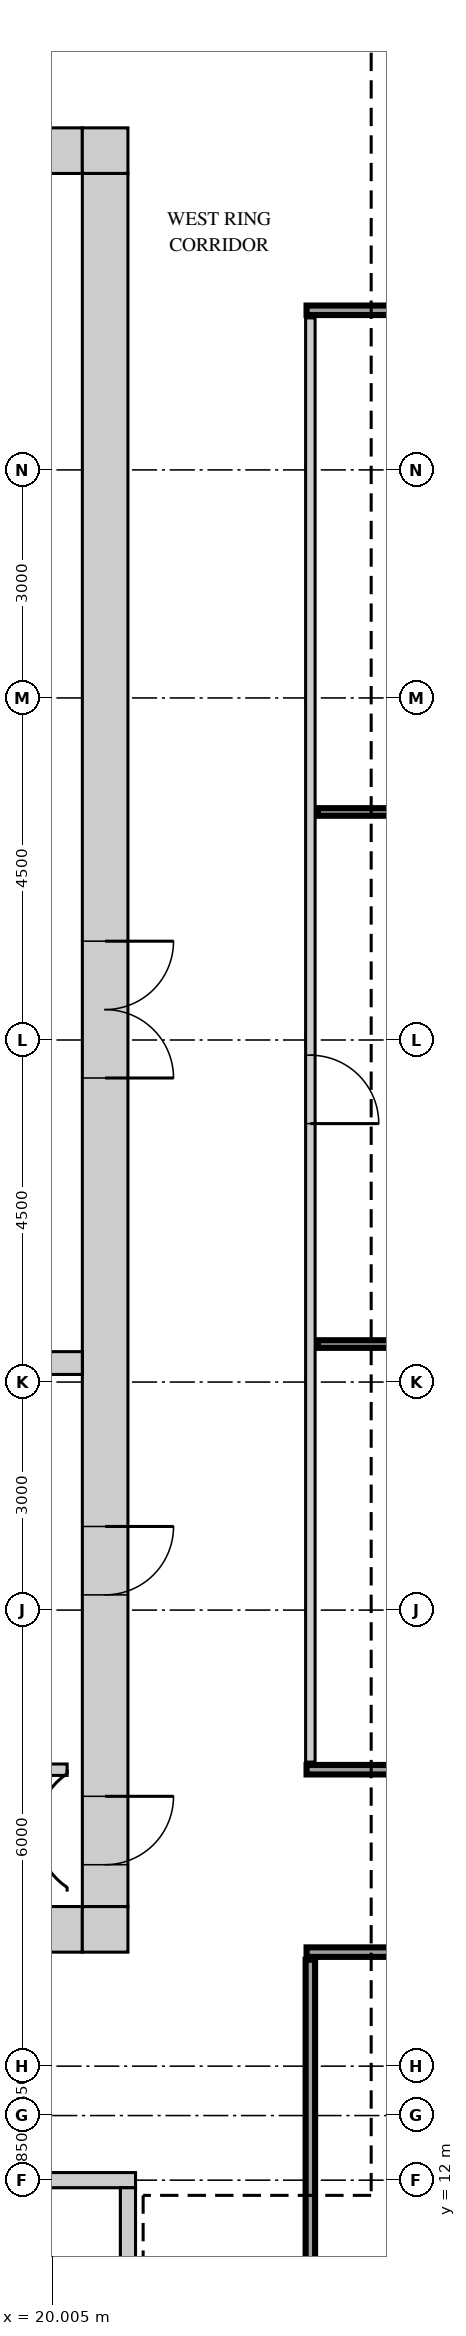
"""IFC4 building model, lengths in metres.
Left out: names, types, materials, properties, quantities, classifications, styles, units other than length and angle.
Written with IfcOpenShell. Run it as: python <this file> out.ifc"""

import sys

from ifc_helpers import new_model, si_unit, direction, frame, frame_2d, origin, place, context, subcontext, project, spatial, rectangle, extrude, source, transform, mapped, element, fill, save


model = new_model("IFC4")
c1 = context("Model", 3, precision=1e-05, world=origin(), true_north=direction((0.0, 1.0)))
c2 = subcontext(c1, "Body", "Model", "MODEL_VIEW")
j1 = project(units=[si_unit("LENGTHUNIT", "METRE"), si_unit("PLANEANGLEUNIT", "RADIAN")], contexts=[c1])
p1 = place(None, origin())
s1 = spatial("IfcSite", under=j1, at=p1, CompositionType="ELEMENT")
p2 = place(p1, origin())
s2 = spatial("IfcBuilding", under=s1, at=p2, CompositionType="ELEMENT")
p3 = place(p2, frame((0.0, 0.0, 302.2)))
s3 = spatial("IfcBuildingStorey", under=s2, at=p3, CompositionType="ELEMENT", Elevation=302.2)
m1 = source(origin(), c2, "Body", "SweptSolid", [
    extrude(rectangle(XDim=14.4, YDim=0.6, at=frame_2d((7.2, 0.0))), origin(), (0.0, 0.0, 1.0), 3.75),
])
p4 = place(p3, frame((6.0, 38.7, 0.0), z_axis=(0.0, 0.0, 1.0), x_axis=(1.0, 0.0, 0.0)))
e1 = element("IfcWall", 1, at=p4, inside=s3, PredefinedType="SHEAR", context=c2, shape_type="MappedRepresentation", body=[
    mapped(m1, transform((0.0, 0.0, 0.0))),
])
m2 = source(origin(), c2, "Body", "SweptSolid", [
    extrude(rectangle(XDim=0.9, YDim=2.1, at=frame_2d((0.45, 1.05))), frame((0.0, 0.31, 0.0), z_axis=(0.0, -1.0, 0.0), x_axis=(1.0, 0.0, 0.0)), (0.0, 0.0, 1.0), 0.62),
])
p5 = place(p4, frame((3.7, 0.0, 0.0)))
e2 = element("IfcOpeningElement", 2, at=p5, cuts=e1, PredefinedType="OPENING", context=c2, shape_type="MappedRepresentation", body=[
    mapped(m2, transform((0.0, 0.0, 0.0))),
])
p6 = place(p4, frame((8.7, 0.0, 0.0)))
e3 = element("IfcOpeningElement", 3, at=p6, cuts=e1, PredefinedType="OPENING", context=c2, shape_type="MappedRepresentation", body=[
    mapped(m2, transform((0.0, 0.0, 0.0))),
])
p7 = place(p4, frame((12.05, 0.0, 0.0)))
e4 = element("IfcOpeningElement", 4, at=p7, cuts=e1, PredefinedType="OPENING", context=c2, shape_type="MappedRepresentation", body=[
    mapped(m2, transform((0.0, 0.0, 0.0))),
])
m3 = source(origin(), c2, "Body", "SweptSolid", [
    extrude(rectangle(XDim=0.6, YDim=0.6, at=frame_2d((0.3, 0.0))), origin(), (0.0, 0.0, 1.0), 3.75),
])
p8 = place(p3, frame((20.4, 38.7, 0.0), z_axis=(0.0, 0.0, 1.0), x_axis=(1.0, 0.0, 0.0)))
e5 = element("IfcWall", 5, at=p8, inside=s3, PredefinedType="SHEAR", context=c2, shape_type="MappedRepresentation", body=[
    mapped(m3, transform((0.0, 0.0, 0.0))),
])
p9 = place(p3, frame((6.0, 15.3, 0.0), z_axis=(0.0, 0.0, 1.0), x_axis=(1.0, 0.0, 0.0)))
e6 = element("IfcWall", 6, at=p9, inside=s3, PredefinedType="SHEAR", context=c2, shape_type="MappedRepresentation", body=[
    mapped(m1, transform((0.0, 0.0, 0.0))),
])
m4 = source(origin(), c2, "Body", "SweptSolid", [
    extrude(rectangle(XDim=1.2, YDim=2.1, at=frame_2d((0.6, 1.05))), frame((0.0, 0.31, 0.0), z_axis=(0.0, -1.0, 0.0), x_axis=(1.0, 0.0, 0.0)), (0.0, 0.0, 1.0), 0.62),
])
p10 = place(p9, frame((6.2, 0.0, 0.0)))
e7 = element("IfcOpeningElement", 7, at=p10, cuts=e6, PredefinedType="OPENING", context=c2, shape_type="MappedRepresentation", body=[
    mapped(m4, transform((0.0, 0.0, 0.0))),
])
p11 = place(p9, frame((2.85, 0.0, 0.0)))
e8 = element("IfcOpeningElement", 8, at=p11, cuts=e6, PredefinedType="OPENING", context=c2, shape_type="MappedRepresentation", body=[
    mapped(m4, transform((0.0, 0.0, 0.0))),
])
m5 = source(origin(), c2, "Body", "SweptSolid", [
    extrude(rectangle(XDim=1.0, YDim=2.1, at=frame_2d((0.5, 1.05))), frame((0.0, 0.31, 0.0), z_axis=(0.0, -1.0, 0.0), x_axis=(1.0, 0.0, 0.0)), (0.0, 0.0, 1.0), 0.62),
])
p12 = place(p9, frame((8.7, 0.0, 0.0)))
e9 = element("IfcOpeningElement", 9, at=p12, cuts=e6, PredefinedType="OPENING", context=c2, shape_type="MappedRepresentation", body=[
    mapped(m5, transform((0.0, 0.0, 0.0))),
])
p13 = place(p3, frame((20.4, 15.3, 0.0), z_axis=(0.0, 0.0, 1.0), x_axis=(1.0, 0.0, 0.0)))
e10 = element("IfcWall", 10, at=p13, inside=s3, PredefinedType="SHEAR", context=c2, shape_type="MappedRepresentation", body=[
    mapped(m3, transform((0.0, 0.0, 0.0))),
])
m6 = source(origin(), c2, "Body", "SweptSolid", [
    extrude(rectangle(XDim=22.8, YDim=0.6, at=frame_2d((11.4, 0.0))), origin(), (0.0, 0.0, 1.0), 3.75),
])
p14 = place(p3, frame((20.7, 15.6, 0.0), z_axis=(0.0, 0.0, 1.0), x_axis=(0.0, 1.0, 0.0)))
e11 = element("IfcWall", 11, at=p14, inside=s3, PredefinedType="SHEAR", context=c2, shape_type="MappedRepresentation", body=[
    mapped(m6, transform((0.0, 0.0, 0.0))),
])
m7 = source(origin(), c2, "Body", "SweptSolid", [
    extrude(rectangle(XDim=1.8, YDim=2.1, at=frame_2d((0.9, 1.05))), frame((0.0, 0.31, 0.0), z_axis=(0.0, -1.0, 0.0), x_axis=(1.0, 0.0, 0.0)), (0.0, 0.0, 1.0), 0.62),
])
p15 = place(p14, frame((10.9, 0.0, 0.0)))
e12 = element("IfcOpeningElement", 12, at=p15, cuts=e11, PredefinedType="OPENING", context=c2, shape_type="MappedRepresentation", body=[
    mapped(m7, transform((0.0, 0.0, 0.0))),
])
p16 = place(p14, frame((0.55, 0.0, 0.0)))
e13 = element("IfcOpeningElement", 13, at=p16, cuts=e11, PredefinedType="OPENING", context=c2, shape_type="MappedRepresentation", body=[
    mapped(m2, transform((0.0, 0.0, 0.0))),
])
p17 = place(p14, frame((4.1, 0.0, 0.0)))
e14 = element("IfcOpeningElement", 14, at=p17, cuts=e11, PredefinedType="OPENING", context=c2, shape_type="MappedRepresentation", body=[
    mapped(m2, transform((0.0, 0.0, 0.0))),
])
m8 = source(origin(), c2, "Body", "SweptSolid", [
    extrude(rectangle(XDim=7.2, YDim=0.2, at=frame_2d((3.6, 0.0))), origin(), (0.0, 0.0, 1.0), 3.75),
])
p18 = place(p3, frame((13.9, 12.0, 0.0), z_axis=(0.0, 0.0, 1.0), x_axis=(1.0, 0.0, 0.0)))
e15 = element("IfcWall", 15, at=p18, inside=s3, PredefinedType="SHEAR", context=c2, shape_type="MappedRepresentation", body=[
    mapped(m8, transform((0.0, 0.0, 0.0))),
])
m9 = source(origin(), c2, "Body", "SweptSolid", [
    extrude(rectangle(XDim=3.35, YDim=0.2, at=frame_2d((1.675, 0.0))), origin(), (0.0, 0.0, 1.0), 3.75),
])
p19 = place(p3, frame((21.0, 8.55, 0.0), z_axis=(0.0, 0.0, 1.0), x_axis=(0.0, 1.0, 0.0)))
e16 = element("IfcWall", 16, at=p19, inside=s3, PredefinedType="SHEAR", context=c2, shape_type="MappedRepresentation", body=[
    mapped(m9, transform((0.0, 0.0, 0.0))),
])
m10 = source(origin(), c2, "Body", "SweptSolid", [
    extrude(rectangle(XDim=13.2, YDim=0.3, at=frame_2d((6.6, 0.0))), origin(), (0.0, 0.0, 1.0), 3.75),
])
p20 = place(p3, frame((7.2, 22.75, 0.0), z_axis=(0.0, 0.0, 1.0), x_axis=(1.0, 0.0, 0.0)))
e17 = element("IfcWall", 17, at=p20, inside=s3, PredefinedType="STANDARD", context=c2, shape_type="MappedRepresentation", body=[
    mapped(m10, transform((0.0, 0.0, 0.0))),
])
m11 = source(origin(), c2, "Body", "SweptSolid", [
    extrude(rectangle(XDim=8.75, YDim=0.125, at=frame_2d((4.375, 0.0))), origin(), (0.0, 0.0, 1.0), 3.8),
])
p21 = place(p3, frame((23.4, 6.15, 0.0), z_axis=(0.0, 0.0, 1.0), x_axis=(0.0, 1.0, 0.0)))
e18 = element("IfcWall", 18, at=p21, inside=s3, PredefinedType="PARTITIONING", context=c2, shape_type="MappedRepresentation", body=[
    mapped(m11, transform((0.0, 0.0, 0.0))),
])
m12 = source(origin(), c2, "Body", "SweptSolid", [
    extrude(rectangle(XDim=19.1, YDim=0.125, at=frame_2d((9.55, 0.0))), origin(), (0.0, 0.0, 1.0), 3.8),
])
p22 = place(p3, frame((23.35, 15.0, 0.0), z_axis=(0.0, 0.0, 1.0), x_axis=(1.0, 0.0, 0.0)))
e19 = element("IfcWall", 19, at=p22, inside=s3, PredefinedType="PARTITIONING", context=c2, shape_type="MappedRepresentation", body=[
    mapped(m12, transform((0.0, 0.0, 0.0))),
])
m13 = source(origin(), c2, "Body", "SweptSolid", [
    extrude(rectangle(XDim=0.9, YDim=2.1, at=frame_2d((0.45, 1.05))), frame((0.0, 0.073, 0.0), z_axis=(0.0, -1.0, 0.0), x_axis=(1.0, 0.0, 0.0)), (0.0, 0.0, 1.0), 0.145),
])
p23 = place(p22, frame((5.3, 0.0, 0.0)))
e20 = element("IfcOpeningElement", 20, at=p23, cuts=e19, PredefinedType="OPENING", context=c2, shape_type="MappedRepresentation", body=[
    mapped(m13, transform((0.0, 0.0, 0.0))),
])
p24 = place(p22, frame((13.3, 0.0, 0.0)))
e21 = element("IfcOpeningElement", 21, at=p24, cuts=e19, PredefinedType="OPENING", context=c2, shape_type="MappedRepresentation", body=[
    mapped(m13, transform((0.0, 0.0, 0.0))),
])
p25 = place(p22, frame((17.95, 0.0, 0.0)))
e22 = element("IfcOpeningElement", 22, at=p25, cuts=e19, PredefinedType="OPENING", context=c2, shape_type="MappedRepresentation", body=[
    mapped(m13, transform((0.0, 0.0, 0.0))),
])
m14 = source(origin(), c2, "Body", "SweptSolid", [
    extrude(rectangle(XDim=4.0, YDim=0.15, at=frame_2d((2.0, 0.0))), origin(), (0.0, 0.0, 1.0), 3.8),
])
p26 = place(p3, frame((16.2, 17.4, 0.0), z_axis=(0.0, 0.0, 1.0), x_axis=(1.0, 0.0, 0.0)))
e23 = element("IfcWall", 23, at=p26, inside=s3, PredefinedType="PARTITIONING", context=c2, shape_type="MappedRepresentation", body=[
    mapped(m14, transform((0.0, 0.0, 0.0))),
])
m15 = source(origin(), c2, "Body", "SweptSolid", [
    extrude(rectangle(XDim=16.7, YDim=0.125, at=frame_2d((8.35, 0.0))), origin(), (0.0, 0.0, 1.0), 3.8),
])
p27 = place(p3, frame((23.35, 17.4, 0.0), z_axis=(0.0, 0.0, 1.0), x_axis=(1.0, 0.0, 0.0)))
e24 = element("IfcWall", 24, at=p27, inside=s3, PredefinedType="PARTITIONING", context=c2, shape_type="MappedRepresentation", body=[
    mapped(m15, transform((0.0, 0.0, 0.0))),
])
p28 = place(p27, frame((8.05, 0.0, 0.0)))
e25 = element("IfcOpeningElement", 25, at=p28, cuts=e24, PredefinedType="OPENING", context=c2, shape_type="MappedRepresentation", body=[
    mapped(m13, transform((0.0, 0.0, 0.0))),
])
m16 = source(origin(), c2, "Body", "SweptSolid", [
    extrude(rectangle(XDim=19.0, YDim=0.125, at=frame_2d((9.5, 0.0))), origin(), (0.0, 0.0, 1.0), 3.8),
])
p29 = place(p3, frame((23.4, 17.5, 0.0), z_axis=(0.0, 0.0, 1.0), x_axis=(0.0, 1.0, 0.0)))
e26 = element("IfcWall", 26, at=p29, inside=s3, PredefinedType="PARTITIONING", context=c2, shape_type="MappedRepresentation", body=[
    mapped(m16, transform((0.0, 0.0, 0.0))),
])
p30 = place(p29, frame((8.4, 0.0, 0.0)))
e27 = element("IfcOpeningElement", 27, at=p30, cuts=e26, PredefinedType="OPENING", context=c2, shape_type="MappedRepresentation", body=[
    mapped(m13, transform((0.0, 0.0, 0.0))),
])
m17 = source(origin(), c2, "Body", "SweptSolid", [
    extrude(rectangle(XDim=16.4, YDim=0.1, at=frame_2d((8.2, 0.0))), origin(), (0.0, 0.0, 1.0), 3.8),
])
for number, where, z_axis, x_axis in (
    (28, (23.5, 23.0, 0.0), (0.0, 0.0, 1.0), (1.0, 0.0, 0.0)),
    (29, (23.5, 30.0, 0.0), (0.0, 0.0, 1.0), (1.0, 0.0, 0.0)),
):
    element("IfcWall", number, at=place(p3, frame(where, z_axis=z_axis, x_axis=x_axis)), inside=s3, PredefinedType="PARTITIONING", context=c2, shape_type="MappedRepresentation", body=[
        mapped(m17, transform((0.0, 0.0, 0.0))),
    ])
p31 = place(p3, frame((23.35, 36.6, 0.0), z_axis=(0.0, 0.0, 1.0), x_axis=(1.0, 0.0, 0.0)))
e30 = element("IfcWall", 30, at=p31, inside=s3, PredefinedType="PARTITIONING", context=c2, shape_type="MappedRepresentation", body=[
    mapped(m15, transform((0.0, 0.0, 0.0))),
])
p32 = place(p31, frame((8.05, 0.0, 0.0)))
e31 = element("IfcOpeningElement", 31, at=p32, cuts=e30, PredefinedType="OPENING", context=c2, shape_type="MappedRepresentation", body=[
    mapped(m13, transform((0.0, 0.0, 0.0))),
])
m18 = source(origin(), c2, "Body", "SweptSolid", [
    extrude(rectangle(XDim=1.8, YDim=2.1, at=frame_2d((0.9, 1.05))), frame((0.0, 0.25, 0.0), z_axis=(0.0, -1.0, 0.0), x_axis=(1.0, 0.0, 0.0)), (0.0, 0.0, 1.0), 0.5),
])
p33 = place(p15, origin())
e32 = element("IfcDoor", 32, at=p33, inside=s3, OperationType="DOUBLE_DOOR_SINGLE_SWING", PredefinedType="DOOR", context=c2, shape_type="MappedRepresentation", body=[
    mapped(m18, transform((0.0, 0.0, 0.0))),
])
fill(e12, e32)
m19 = source(origin(), c2, "Body", "SweptSolid", [
    extrude(rectangle(XDim=0.9, YDim=2.1, at=frame_2d((0.45, 1.05))), frame((0.0, 0.25, 0.0), z_axis=(0.0, -1.0, 0.0), x_axis=(1.0, 0.0, 0.0)), (0.0, 0.0, 1.0), 0.5),
])
p34 = place(p16, origin())
e33 = element("IfcDoor", 33, at=p34, inside=s3, OperationType="SINGLE_SWING_RIGHT", PredefinedType="DOOR", context=c2, shape_type="MappedRepresentation", body=[
    mapped(m19, transform((0.0, 0.0, 0.0))),
])
fill(e13, e33)
p35 = place(p17, origin())
e34 = element("IfcDoor", 34, at=p35, inside=s3, OperationType="SINGLE_SWING_RIGHT", PredefinedType="DOOR", context=c2, shape_type="MappedRepresentation", body=[
    mapped(m19, transform((0.0, 0.0, 0.0))),
])
fill(e14, e34)
m20 = source(origin(), c2, "Body", "SweptSolid", [
    extrude(rectangle(XDim=0.9, YDim=2.1, at=frame_2d((0.45, 1.05))), frame((0.0, 0.025, 0.0), z_axis=(0.0, -1.0, 0.0), x_axis=(1.0, 0.0, 0.0)), (0.0, 0.0, 1.0), 0.05),
])
p36 = place(p30, origin())
e35 = element("IfcDoor", 35, at=p36, inside=s3, OperationType="SINGLE_SWING_LEFT", PredefinedType="DOOR", context=c2, shape_type="MappedRepresentation", body=[
    mapped(m20, transform((0.0, 0.0, 0.0))),
])
fill(e27, e35)
save(model, sys.argv[1])
